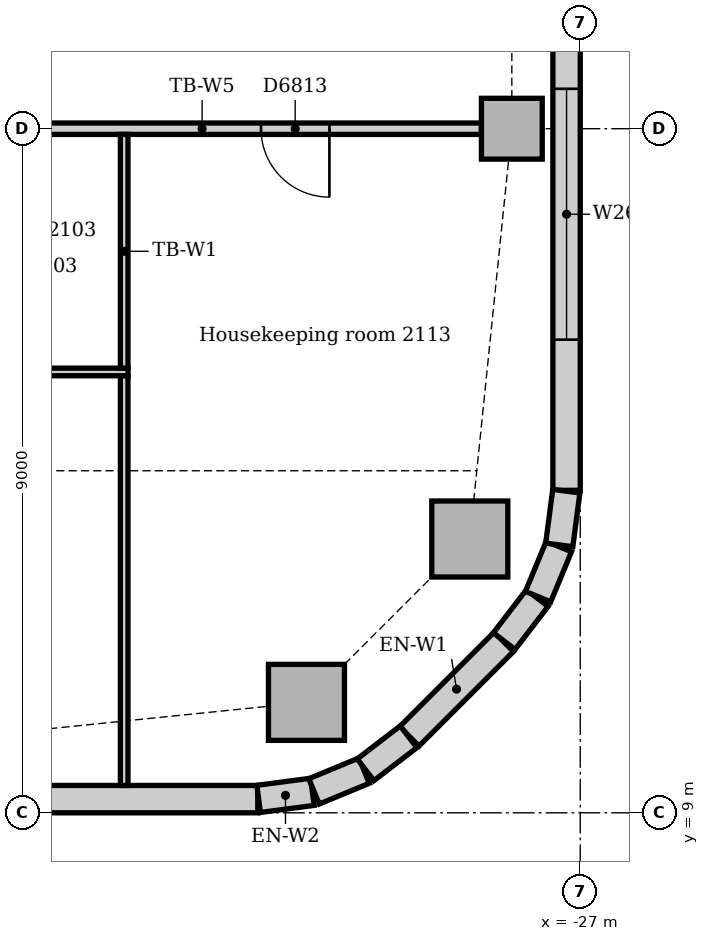
"""IFC4 building model, lengths in metres.
Left out: names, types, materials, properties, quantities, classifications, styles, units other than length and angle.
Written with IfcOpenShell. Run it as: python <this file> out.ifc"""

import sys

from ifc_helpers import new_model, si_unit, direction, frame, frame_2d, origin, origin_2d, place, context, subcontext, project, spatial, rectangle, extrude, element, fill, save


model = new_model("IFC4")
c1 = context("Model", 3, precision=1e-05, world=origin(), true_north=direction((0.0, 1.0)))
c2 = subcontext(c1, "Body", "Model", "MODEL_VIEW")
j1 = project(units=[si_unit("LENGTHUNIT", "METRE"), si_unit("PLANEANGLEUNIT", "RADIAN")], contexts=[c1])
p1 = place(None, origin())
s1 = spatial("IfcSite", under=j1, at=p1, CompositionType="ELEMENT")
p2 = place(p1, origin())
s2 = spatial("IfcBuilding", under=s1, at=p2, CompositionType="ELEMENT")
p3 = place(p2, frame((0.0, 0.0, 91.0)))
s3 = spatial("IfcBuildingStorey", under=s2, at=p3, CompositionType="ELEMENT", Elevation=91.0)
for number, where, z_axis, x_axis in (
    (1, (-30.602, 10.453, 0.0), (0.0, 0.0, 1.0), (1.0, 0.0, 0.0)),
    (2, (-28.453, 12.602, 0.0), (0.0, 0.0, 1.0), (1.0, 0.0, 0.0)),
):
    element("IfcColumn", number, at=place(p3, frame(where, z_axis=z_axis, x_axis=x_axis)), inside=s3, PredefinedType="COLUMN", context=c2, shape_type="SweptSolid", body=[
        extrude(rectangle(XDim=1.0, YDim=1.0, at=origin_2d()), origin(), (0.0, 0.0, 1.0), 3.7),
    ])
p4 = place(p3, frame((-27.9, 18.0, 0.0), z_axis=(0.0, 0.0, 1.0), x_axis=(1.0, 0.0, 0.0)))
e3 = element("IfcColumn", 3, at=p4, inside=s3, PredefinedType="COLUMN", context=c2, shape_type="SweptSolid", body=[
    extrude(rectangle(XDim=0.8, YDim=0.8, at=origin_2d()), origin(), (0.0, 0.0, 1.0), 3.7),
])
p5 = place(p3, frame((-55.007, 9.18, 0.0), z_axis=(0.0, 0.0, 1.0), x_axis=(1.0, 0.0, 0.0)))
e4 = element("IfcWall", 4, at=p5, inside=s3, PredefinedType="STANDARD", context=c2, shape_type="SweptSolid", body=[
    extrude(rectangle(XDim=23.765, YDim=0.36, at=frame_2d((11.882, 0.0))), origin(), (0.0, 0.0, 1.0), 3.7),
])
p6 = place(p5, frame((3.482, 0.0, 0.9)))
e5 = element("IfcOpeningElement", 5, at=p6, cuts=e4, PredefinedType="OPENING", context=c2, shape_type="SweptSolid", body=[
    extrude(rectangle(XDim=3.3, YDim=1.6, at=frame_2d((1.65, 0.8))), frame((0.0, 0.19, 0.0), z_axis=(0.0, -1.0, 0.0), x_axis=(1.0, 0.0, 0.0)), (0.0, 0.0, 1.0), 0.38),
])
p7 = place(p5, frame((7.982, 0.0, 0.9)))
e6 = element("IfcOpeningElement", 6, at=p7, cuts=e4, PredefinedType="OPENING", context=c2, shape_type="SweptSolid", body=[
    extrude(rectangle(XDim=3.3, YDim=1.6, at=frame_2d((1.65, 0.8))), frame((0.0, 0.19, 0.0), z_axis=(0.0, -1.0, 0.0), x_axis=(1.0, 0.0, 0.0)), (0.0, 0.0, 1.0), 0.38),
])
p8 = place(p5, frame((13.232, 0.0, 0.9)))
e7 = element("IfcOpeningElement", 7, at=p8, cuts=e4, PredefinedType="OPENING", context=c2, shape_type="SweptSolid", body=[
    extrude(rectangle(XDim=1.8, YDim=1.6, at=frame_2d((0.9, 0.8))), frame((0.0, 0.19, 0.0), z_axis=(0.0, -1.0, 0.0), x_axis=(1.0, 0.0, 0.0)), (0.0, 0.0, 1.0), 0.38),
])
p9 = place(p5, frame((16.982, 0.0, 0.9)))
e8 = element("IfcOpeningElement", 8, at=p9, cuts=e4, PredefinedType="OPENING", context=c2, shape_type="SweptSolid", body=[
    extrude(rectangle(XDim=3.3, YDim=1.6, at=frame_2d((1.65, 0.8))), frame((0.0, 0.19, 0.0), z_axis=(0.0, -1.0, 0.0), x_axis=(1.0, 0.0, 0.0)), (0.0, 0.0, 1.0), 0.38),
])
p10 = place(p3, frame((-29.249, 10.006, 0.0), z_axis=(0.0, 0.0, 1.0), x_axis=(0.707106781187, 0.707106781187, 0.0)))
e9 = element("IfcWall", 9, at=p10, inside=s3, PredefinedType="STANDARD", context=c2, shape_type="SweptSolid", body=[
    extrude(rectangle(XDim=1.757, YDim=0.36, at=frame_2d((0.879, 0.0))), origin(), (0.0, 0.0, 1.0), 3.7),
])
p11 = place(p3, frame((-27.18, 13.243, 0.0), z_axis=(0.0, 0.0, 1.0), x_axis=(0.0, 1.0, 0.0)))
e10 = element("IfcWall", 10, at=p11, inside=s3, PredefinedType="STANDARD", context=c2, shape_type="SweptSolid", body=[
    extrude(rectangle(XDim=7.757, YDim=0.36, at=frame_2d((3.879, 0.0))), origin(), (0.0, 0.0, 1.0), 3.7),
])
p12 = place(p11, frame((1.982, 0.0, 0.9)))
e11 = element("IfcOpeningElement", 11, at=p12, cuts=e10, PredefinedType="OPENING", context=c2, shape_type="SweptSolid", body=[
    extrude(rectangle(XDim=3.3, YDim=1.6, at=frame_2d((1.65, 0.8))), frame((0.0, 0.19, 0.0), z_axis=(0.0, -1.0, 0.0), x_axis=(1.0, 0.0, 0.0)), (0.0, 0.0, 1.0), 0.38),
])
for number, where, z_axis, x_axis in (
    (12, (-31.231, 9.183, 0.0), (0.0, 0.0, 1.0), (0.991, 0.131, 0.0)),
    (13, (-30.503, 9.282, 0.0), (0.0, 0.0, 1.0), (0.924, 0.383, 0.0)),
):
    element("IfcWall", number, at=place(p3, frame(where, z_axis=z_axis, x_axis=x_axis)), inside=s3, PredefinedType="STANDARD", context=c2, shape_type="SweptSolid", body=[
        extrude(rectangle(XDim=0.713, YDim=0.36, at=frame_2d((0.356, 0.0))), origin(), (0.0, 0.0, 1.0), 3.7),
    ])
for number, where, z_axis, x_axis in (
    (14, (-29.825, 9.566, 0.0), (0.0, 0.0, 1.0), (0.793, 0.609, 0.0)),
    (15, (-28.0, 11.259, 0.0), (0.0, 0.0, 1.0), (0.609, 0.793, 0.0)),
):
    element("IfcWall", number, at=place(p3, frame(where, z_axis=z_axis, x_axis=x_axis)), inside=s3, PredefinedType="STANDARD", context=c2, shape_type="SweptSolid", body=[
        extrude(rectangle(XDim=0.713, YDim=0.36, at=frame_2d((0.357, 0.0))), origin(), (0.0, 0.0, 1.0), 3.7),
    ])
for number, where, z_axis, x_axis in (
    (16, (-27.555, 11.844, 0.0), (0.0, 0.0, 1.0), (0.383, 0.924, 0.0)),
    (17, (-27.276, 12.524, 0.0), (0.0, 0.0, 1.0), (0.131, 0.991, 0.0)),
):
    element("IfcWall", number, at=place(p3, frame(where, z_axis=z_axis, x_axis=x_axis)), inside=s3, PredefinedType="STANDARD", context=c2, shape_type="SweptSolid", body=[
        extrude(rectangle(XDim=0.713, YDim=0.36, at=frame_2d((0.356, 0.0))), origin(), (0.0, 0.0, 1.0), 3.7),
    ])
p13 = place(p3, frame((-35.65, 18.0, 0.0), z_axis=(0.0, 0.0, 1.0), x_axis=(1.0, 0.0, 0.0)))
e18 = element("IfcWall", 18, at=p13, inside=s3, PredefinedType="PARTITIONING", context=c2, shape_type="SweptSolid", body=[
    extrude(rectangle(XDim=7.35, YDim=0.15, at=frame_2d((3.675, 0.0))), origin(), (0.0, 0.0, 1.0), 3.008),
])
p14 = place(p13, frame((4.45, 0.0, 0.0)))
e19 = element("IfcOpeningElement", 19, at=p14, cuts=e18, PredefinedType="OPENING", context=c2, shape_type="SweptSolid", body=[
    extrude(rectangle(XDim=0.9, YDim=2.1, at=frame_2d((0.45, 1.05))), frame((0.0, 0.085, 0.0), z_axis=(0.0, -1.0, 0.0), x_axis=(1.0, 0.0, 0.0)), (0.0, 0.0, 1.0), 0.17),
])
p15 = place(p3, frame((-41.925, 14.8, 0.0), z_axis=(0.0, 0.0, 1.0), x_axis=(1.0, 0.0, 0.0)))
e20 = element("IfcWall", 20, at=p15, inside=s3, PredefinedType="PARTITIONING", context=c2, shape_type="SweptSolid", body=[
    extrude(rectangle(XDim=8.975, YDim=0.1, at=frame_2d((4.487, 0.0))), origin(), (0.0, 0.0, 1.0), 3.7),
])
p16 = place(p15, frame((3.265, 0.0, 0.0)))
e21 = element("IfcOpeningElement", 21, at=p16, cuts=e20, PredefinedType="OPENING", context=c2, shape_type="SweptSolid", body=[
    extrude(rectangle(XDim=0.9, YDim=2.1, at=frame_2d((0.45, 1.05))), frame((0.0, 0.06, 0.0), z_axis=(0.0, -1.0, 0.0), x_axis=(1.0, 0.0, 0.0)), (0.0, 0.0, 1.0), 0.12),
])
p17 = place(p3, frame((-33.0, 14.85, 0.0), z_axis=(0.0, 0.0, 1.0), x_axis=(0.0, 1.0, 0.0)))
e22 = element("IfcWall", 22, at=p17, inside=s3, PredefinedType="PARTITIONING", context=c2, shape_type="SweptSolid", body=[
    extrude(rectangle(XDim=3.075, YDim=0.1, at=frame_2d((1.538, 0.0))), origin(), (0.0, 0.0, 1.0), 3.7),
])
p18 = place(p3, frame((-33.0, 9.36, 0.0), z_axis=(0.0, 0.0, 1.0), x_axis=(0.0, 1.0, 0.0)))
e23 = element("IfcWall", 23, at=p18, inside=s3, PredefinedType="PARTITIONING", context=c2, shape_type="SweptSolid", body=[
    extrude(rectangle(XDim=5.39, YDim=0.1, at=frame_2d((2.695, 0.0))), origin(), (0.0, 0.0, 1.0), 3.7),
])
p19 = place(p12, origin())
e24 = element("IfcWindow", 24, at=p19, inside=s3, PartitioningType="SINGLE_PANEL", PredefinedType="WINDOW", context=c2, shape_type="SweptSolid", body=[
    extrude(rectangle(XDim=3.3, YDim=1.6, at=frame_2d((1.65, 0.8))), frame((0.0, 0.13, 0.0), z_axis=(0.0, -1.0, 0.0), x_axis=(1.0, 0.0, 0.0)), (0.0, 0.0, 1.0), 0.06),
])
fill(e11, e24)
p20 = place(p14, frame((0.9, 0.0, 0.0), z_axis=(0.0, 0.0, 1.0), x_axis=(-1.0, 0.0, 0.0)))
e25 = element("IfcDoor", 25, at=p20, inside=s3, OperationType="SINGLE_SWING_LEFT", PredefinedType="DOOR", context=c2, shape_type="SweptSolid", body=[
    extrude(rectangle(XDim=0.9, YDim=2.1, at=frame_2d((0.45, 1.05))), frame((0.0, 0.025, 0.0), z_axis=(0.0, -1.0, 0.0), x_axis=(1.0, 0.0, 0.0)), (0.0, 0.0, 1.0), 0.05),
])
fill(e19, e25)
save(model, sys.argv[1])
